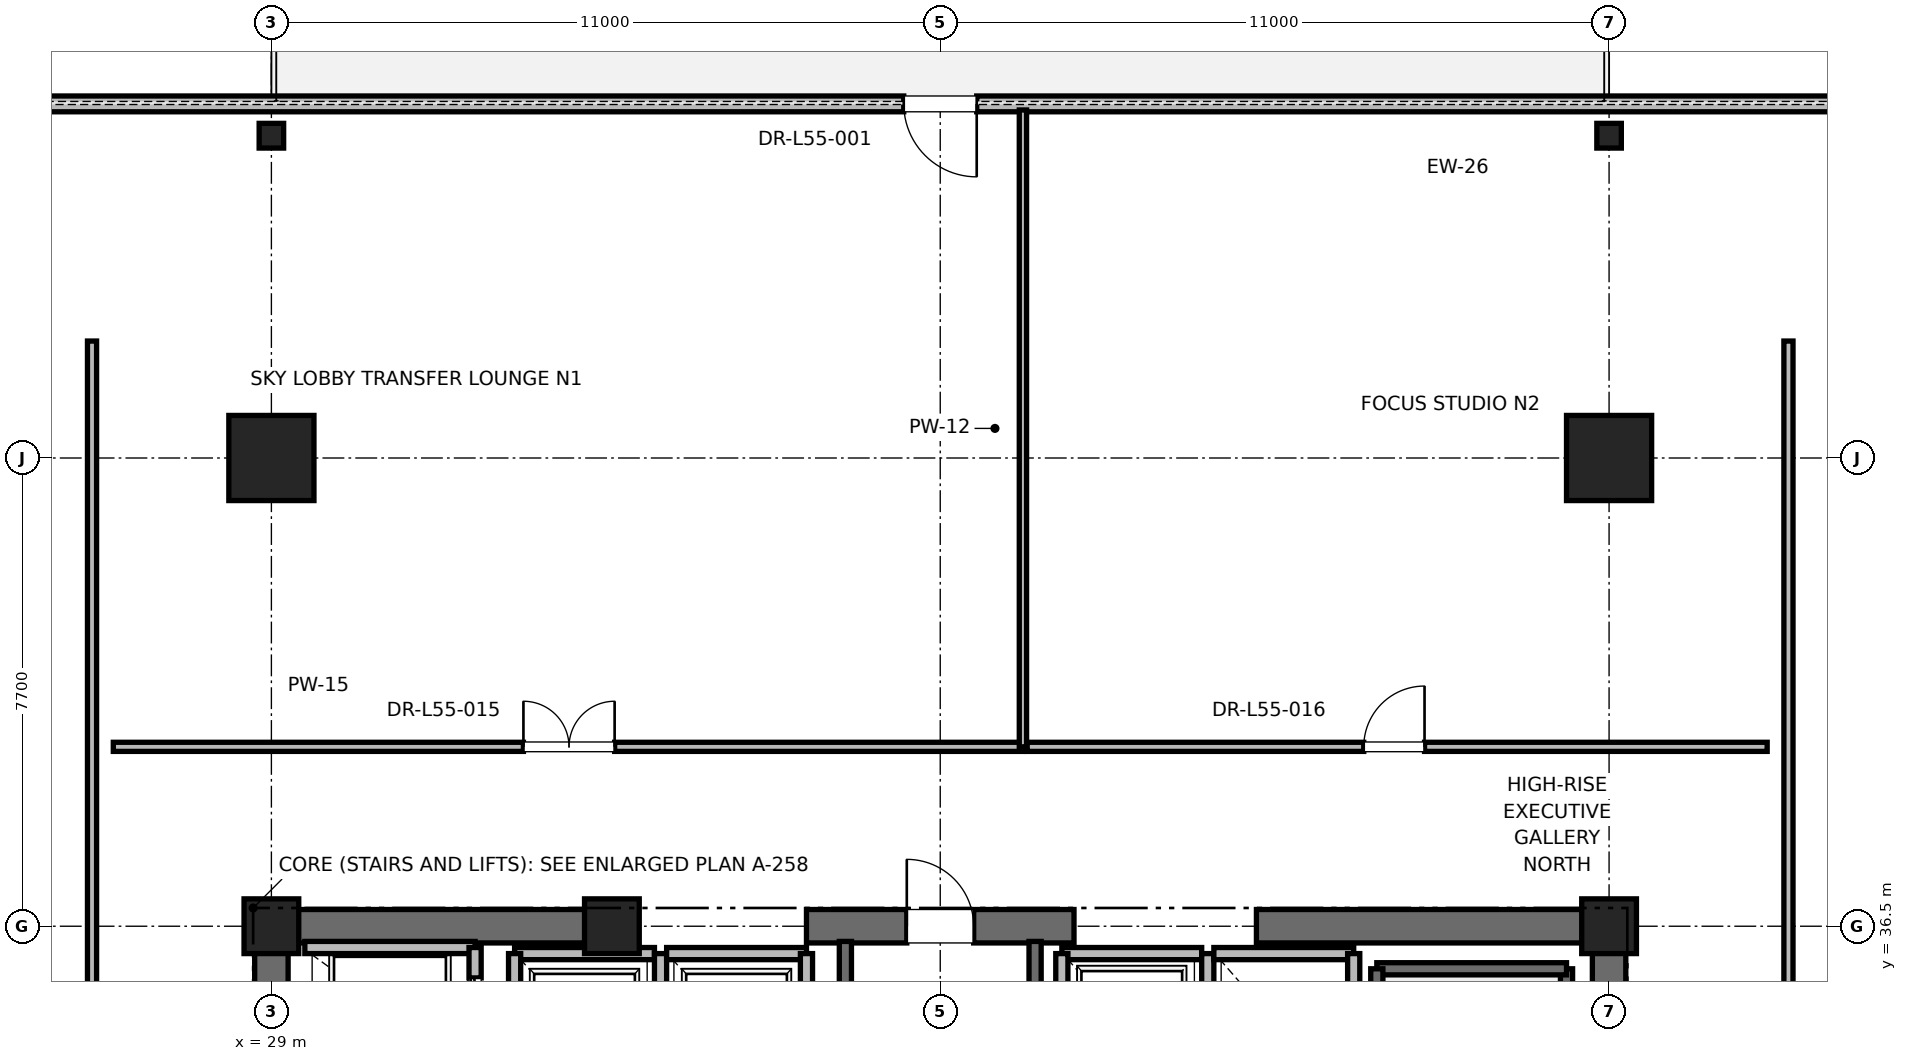
"""IFC4 building model, lengths in metres.
Left out: names, types, materials, properties, quantities, classifications, styles, units other than length and angle.
Written with IfcOpenShell. Run it as: python <this file> out.ifc"""

import sys

from ifc_helpers import new_model, si_unit, direction, frame, frame_2d, origin, origin_2d, place, context, subcontext, project, spatial, rectangle, i_section, extrude, element, fill, save


model = new_model("IFC4")
c1 = context("Model", 3, precision=1e-05, world=origin(), true_north=direction((0.0, 1.0)))
c2 = subcontext(c1, "Body", "Model", "MODEL_VIEW")
j1 = project(units=[si_unit("LENGTHUNIT", "METRE"), si_unit("PLANEANGLEUNIT", "RADIAN")], contexts=[c1])
p1 = place(None, origin())
s1 = spatial("IfcSite", under=j1, at=p1, CompositionType="ELEMENT")
p2 = place(p1, origin())
s2 = spatial("IfcBuilding", under=s1, at=p2, CompositionType="ELEMENT")
p3 = place(p2, frame((0.0, 0.0, 238.2)))
s3 = spatial("IfcBuildingStorey", under=s2, at=p3, CompositionType="ELEMENT", Elevation=238.2)
for number, where, z_axis, x_axis in (
    (1, (29.0, 44.2, 0.0), (0.0, 0.0, 1.0), (1.0, 0.0, 0.0)),
    (2, (51.0, 44.2, 0.0), (0.0, 0.0, 1.0), (1.0, 0.0, 0.0)),
):
    element("IfcColumn", number, at=place(p3, frame(where, z_axis=z_axis, x_axis=x_axis)), inside=s3, PredefinedType="COLUMN", context=c2, shape_type="SweptSolid", body=[
        extrude(rectangle(XDim=1.4, YDim=1.4, at=origin_2d()), origin(), (0.0, 0.0, 1.0), 5.0),
    ])
for number, where, z_axis, x_axis in (
    (3, (29.0, 49.5, 0.0), (0.0, 0.0, 1.0), (1.0, 0.0, 0.0)),
    (4, (51.0, 49.5, 0.0), (0.0, 0.0, 1.0), (1.0, 0.0, 0.0)),
):
    element("IfcColumn", number, at=place(p3, frame(where, z_axis=z_axis, x_axis=x_axis)), inside=s3, PredefinedType="COLUMN", context=c2, shape_type="SweptSolid", body=[
        extrude(i_section(OverallWidth=0.403, OverallDepth=0.406, WebThickness=0.027, FlangeThickness=0.043, FilletRadius=0.015, at=origin_2d()), origin(), (0.0, 0.0, 1.0), 5.0),
    ])
for number, where, z_axis, x_axis in (
    (5, (29.0, 36.5, 0.0), (0.0, 0.0, 1.0), (1.0, 0.0, 0.0)),
    (6, (51.0, 36.5, 0.0), (0.0, 0.0, 1.0), (1.0, 0.0, 0.0)),
    (7, (34.6, 36.5, 0.0), (0.0, 0.0, 1.0), (1.0, 0.0, 0.0)),
):
    element("IfcColumn", number, at=place(p3, frame(where, z_axis=z_axis, x_axis=x_axis)), inside=s3, PredefinedType="PILASTER", context=c2, shape_type="SweptSolid", body=[
        extrude(rectangle(XDim=0.9, YDim=0.9, at=origin_2d()), origin(), (0.0, 0.0, 1.0), 5.0),
    ])
p4 = place(p3, frame((29.0, 36.5, 0.0), z_axis=(0.0, 0.0, 1.0), x_axis=(1.0, 0.0, 0.0)))
e8 = element("IfcWall", 8, at=p4, inside=s3, PredefinedType="SHEAR", context=c2, shape_type="SweptSolid", body=[
    extrude(rectangle(XDim=5.8, YDim=0.55, at=frame_2d((2.9, 0.0))), origin(), (0.0, 0.0, 1.0), 4.785),
])
p5 = place(p3, frame((37.8, 36.5, 0.0), z_axis=(0.0, 0.0, 1.0), x_axis=(1.0, 0.0, 0.0)))
e9 = element("IfcWall", 9, at=p5, inside=s3, PredefinedType="SHEAR", context=c2, shape_type="SweptSolid", body=[
    extrude(rectangle(XDim=4.4, YDim=0.55, at=frame_2d((2.2, 0.0))), origin(), (0.0, 0.0, 1.0), 4.785),
])
p6 = place(p5, frame((1.65, 0.0, 0.0)))
e10 = element("IfcOpeningElement", 10, at=p6, cuts=e9, PredefinedType="OPENING", context=c2, shape_type="SweptSolid", body=[
    extrude(rectangle(XDim=1.1, YDim=2.15, at=frame_2d((0.55, 1.075))), frame((0.0, 0.275, 0.0), z_axis=(0.0, -1.0, 0.0), x_axis=(1.0, 0.0, 0.0)), (0.0, 0.0, 1.0), 0.55),
])
for number, where, z_axis, x_axis in (
    (11, (45.2, 36.5, 0.0), (0.0, 0.0, 1.0), (1.0, 0.0, 0.0)),
    (12, (29.0, 30.7, 0.0), (0.0, 0.0, 1.0), (0.0, 1.0, 0.0)),
):
    element("IfcWall", number, at=place(p3, frame(where, z_axis=z_axis, x_axis=x_axis)), inside=s3, PredefinedType="SHEAR", context=c2, shape_type="SweptSolid", body=[
        extrude(rectangle(XDim=5.8, YDim=0.55, at=frame_2d((2.9, 0.0))), origin(), (0.0, 0.0, 1.0), 4.785),
    ])
p7 = place(p3, frame((51.0, 27.7, 0.0), z_axis=(0.0, 0.0, 1.0), x_axis=(0.0, 1.0, 0.0)))
e13 = element("IfcWall", 13, at=p7, inside=s3, PredefinedType="SHEAR", context=c2, shape_type="SweptSolid", body=[
    extrude(rectangle(XDim=8.8, YDim=0.55, at=frame_2d((4.4, 0.0))), origin(), (0.0, 0.0, 1.0), 4.785),
])
p8 = place(p3, frame((62.221, 50.023, 0.0), z_axis=(0.0, 0.0, 1.0), x_axis=(-1.0, 0.0, 0.0)))
e14 = element("IfcWall", 14, at=p8, inside=s3, PredefinedType="PARAPET", context=c2, shape_type="SweptSolid", body=[
    extrude(rectangle(XDim=44.441, YDim=0.26, at=frame_2d((22.221, 0.0))), origin(), (0.0, 0.0, 1.0), 4.047),
])
p9 = place(p8, frame((4.2, 0.0, 0.85)))
e15 = element("IfcOpeningElement", 15, at=p9, cuts=e14, PredefinedType="OPENING", context=c2, shape_type="SweptSolid", body=[
    extrude(rectangle(XDim=1.6, YDim=2.1, at=frame_2d((0.8, 1.05))), frame((0.0, 0.13, 0.0), z_axis=(0.0, -1.0, 0.0), x_axis=(1.0, 0.0, 0.0)), (0.0, 0.0, 1.0), 0.26),
])
p10 = place(p8, frame((21.621, 0.0, 0.0)))
e16 = element("IfcOpeningElement", 16, at=p10, cuts=e14, PredefinedType="OPENING", context=c2, shape_type="SweptSolid", body=[
    extrude(rectangle(XDim=1.2, YDim=2.2, at=frame_2d((0.6, 1.1))), frame((0.0, 0.13, 0.0), z_axis=(0.0, -1.0, 0.0), x_axis=(1.0, 0.0, 0.0)), (0.0, 0.0, 1.0), 0.26),
])
p11 = place(p8, frame((38.641, 0.0, 0.85)))
e17 = element("IfcOpeningElement", 17, at=p11, cuts=e14, PredefinedType="OPENING", context=c2, shape_type="SweptSolid", body=[
    extrude(rectangle(XDim=1.6, YDim=2.1, at=frame_2d((0.8, 1.05))), frame((0.0, 0.13, 0.0), z_axis=(0.0, -1.0, 0.0), x_axis=(1.0, 0.0, 0.0)), (0.0, 0.0, 1.0), 0.26),
])
p12 = place(p3, frame((50.3, 27.65, 0.0), z_axis=(0.0, 0.0, 1.0), x_axis=(0.0, 1.0, 0.0)))
e18 = element("IfcWall", 18, at=p12, inside=s3, PredefinedType="SOLIDWALL", context=c2, shape_type="SweptSolid", body=[
    extrude(rectangle(XDim=8.15, YDim=0.2, at=frame_2d((4.075, 0.0))), origin(), (0.0, 0.0, 1.0), 4.785),
])
p13 = place(p3, frame((47.18, 35.8, 0.0), z_axis=(0.0, 0.0, 1.0), x_axis=(1.0, 0.0, 0.0)))
e19 = element("IfcWall", 19, at=p13, inside=s3, PredefinedType="SOLIDWALL", context=c2, shape_type="SweptSolid", body=[
    extrude(rectangle(XDim=3.12, YDim=0.2, at=frame_2d((1.56, 0.0))), origin(), (0.0, 0.0, 1.0), 4.785),
])
p14 = place(p3, frame((47.18, 27.62, 0.0), z_axis=(0.0, 0.0, 1.0), x_axis=(0.0, 1.0, 0.0)))
e20 = element("IfcWall", 20, at=p14, inside=s3, PredefinedType="SOLIDWALL", context=c2, shape_type="SweptSolid", body=[
    extrude(rectangle(XDim=8.18, YDim=0.2, at=frame_2d((4.09, 0.0))), origin(), (0.0, 0.0, 1.0), 4.785),
])
p15 = place(p3, frame((38.44, 27.38, 0.0), z_axis=(0.0, 0.0, 1.0), x_axis=(0.0, 1.0, 0.0)))
e21 = element("IfcWall", 21, at=p15, inside=s3, PredefinedType="SOLIDWALL", context=c2, shape_type="SweptSolid", body=[
    extrude(rectangle(XDim=8.87, YDim=0.2, at=frame_2d((4.435, 0.0))), origin(), (0.0, 0.0, 1.0), 4.785),
])
p16 = place(p3, frame((41.56, 27.68, 0.0), z_axis=(0.0, 0.0, 1.0), x_axis=(0.0, 1.0, 0.0)))
e22 = element("IfcWall", 22, at=p16, inside=s3, PredefinedType="SOLIDWALL", context=c2, shape_type="SweptSolid", body=[
    extrude(rectangle(XDim=8.57, YDim=0.2, at=frame_2d((4.285, 0.0))), origin(), (0.0, 0.0, 1.0), 4.785),
])
p17 = place(p3, frame((32.35, 36.15, 0.0), z_axis=(0.0, 0.0, 1.0), x_axis=(-1.0, 0.0, 0.0)))
e23 = element("IfcWall", 23, at=p17, inside=s3, PredefinedType="SOLIDWALL", context=c2, shape_type="SweptSolid", body=[
    extrude(rectangle(XDim=2.8, YDim=0.2, at=frame_2d((1.4, 0.0))), origin(), (0.0, 0.0, 1.0), 4.072),
])
p18 = place(p3, frame((32.35, 34.05, 0.0), z_axis=(0.0, 0.0, 1.0), x_axis=(0.0, 1.0, 0.0)))
e24 = element("IfcWall", 24, at=p18, inside=s3, PredefinedType="SOLIDWALL", context=c2, shape_type="SweptSolid", body=[
    extrude(rectangle(XDim=2.1, YDim=0.2, at=frame_2d((1.05, 0.0))), origin(), (0.0, 0.0, 1.0), 4.785),
])
p19 = place(p18, frame((0.5, 0.0, 0.0)))
e25 = element("IfcOpeningElement", 25, at=p19, cuts=e24, PredefinedType="OPENING", context=c2, shape_type="SweptSolid", body=[
    extrude(rectangle(XDim=1.1, YDim=2.2, at=frame_2d((0.55, 1.1))), frame((0.0, 0.1, 0.0), z_axis=(0.0, -1.0, 0.0), x_axis=(1.0, 0.0, 0.0)), (0.0, 0.0, 1.0), 0.2),
])
p20 = place(p3, frame((35.3, 36.05, 0.0), z_axis=(0.0, 0.0, 1.0), x_axis=(-1.0, 0.0, 0.0)))
e26 = element("IfcWall", 26, at=p20, inside=s3, PredefinedType="SOLIDWALL", context=c2, shape_type="SweptSolid", body=[
    extrude(rectangle(XDim=2.3, YDim=0.2, at=frame_2d((1.15, 0.0))), origin(), (0.0, 0.0, 1.0), 3.765),
])
p21 = place(p3, frame((33.0, 36.05, 0.0), z_axis=(0.0, 0.0, 1.0), x_axis=(0.0, -1.0, 0.0)))
e27 = element("IfcWall", 27, at=p21, inside=s3, PredefinedType="SOLIDWALL", context=c2, shape_type="SweptSolid", body=[
    extrude(rectangle(XDim=2.6, YDim=0.2, at=frame_2d((1.3, 0.0))), origin(), (0.0, 0.0, 1.0), 4.785),
])
p22 = place(p3, frame((35.4, 33.45, 0.0), z_axis=(0.0, 0.0, 1.0), x_axis=(0.0, 1.0, 0.0)))
e28 = element("IfcWall", 28, at=p22, inside=s3, PredefinedType="SOLIDWALL", context=c2, shape_type="SweptSolid", body=[
    extrude(rectangle(XDim=2.6, YDim=0.2, at=frame_2d((1.3, 0.0))), origin(), (0.0, 0.0, 1.0), 3.765),
])
p23 = place(p3, frame((37.8, 36.05, 0.0), z_axis=(0.0, 0.0, 1.0), x_axis=(-1.0, 0.0, 0.0)))
e29 = element("IfcWall", 29, at=p23, inside=s3, PredefinedType="SOLIDWALL", context=c2, shape_type="SweptSolid", body=[
    extrude(rectangle(XDim=2.3, YDim=0.2, at=frame_2d((1.15, 0.0))), origin(), (0.0, 0.0, 1.0), 3.765),
])
p24 = place(p3, frame((37.8, 33.45, 0.0), z_axis=(0.0, 0.0, 1.0), x_axis=(0.0, 1.0, 0.0)))
e30 = element("IfcWall", 30, at=p24, inside=s3, PredefinedType="SOLIDWALL", context=c2, shape_type="SweptSolid", body=[
    extrude(rectangle(XDim=2.6, YDim=0.2, at=frame_2d((1.3, 0.0))), origin(), (0.0, 0.0, 1.0), 3.765),
])
p25 = place(p3, frame((44.3, 36.05, 0.0), z_axis=(0.0, 0.0, 1.0), x_axis=(-1.0, 0.0, 0.0)))
e31 = element("IfcWall", 31, at=p25, inside=s3, PredefinedType="SOLIDWALL", context=c2, shape_type="SweptSolid", body=[
    extrude(rectangle(XDim=2.3, YDim=0.2, at=frame_2d((1.15, 0.0))), origin(), (0.0, 0.0, 1.0), 3.765),
])
for number, where, z_axis, x_axis in (
    (32, (42.0, 36.05, 0.0), (0.0, 0.0, 1.0), (0.0, -1.0, 0.0)),
    (33, (44.4, 33.45, 0.0), (0.0, 0.0, 1.0), (0.0, 1.0, 0.0)),
):
    element("IfcWall", number, at=place(p3, frame(where, z_axis=z_axis, x_axis=x_axis)), inside=s3, PredefinedType="SOLIDWALL", context=c2, shape_type="SweptSolid", body=[
        extrude(rectangle(XDim=2.6, YDim=0.2, at=frame_2d((1.3, 0.0))), origin(), (0.0, 0.0, 1.0), 3.765),
    ])
p26 = place(p3, frame((46.8, 36.05, 0.0), z_axis=(0.0, 0.0, 1.0), x_axis=(-1.0, 0.0, 0.0)))
e34 = element("IfcWall", 34, at=p26, inside=s3, PredefinedType="SOLIDWALL", context=c2, shape_type="SweptSolid", body=[
    extrude(rectangle(XDim=2.3, YDim=0.2, at=frame_2d((1.15, 0.0))), origin(), (0.0, 0.0, 1.0), 3.765),
])
p27 = place(p3, frame((46.8, 33.45, 0.0), z_axis=(0.0, 0.0, 1.0), x_axis=(0.0, 1.0, 0.0)))
e35 = element("IfcWall", 35, at=p27, inside=s3, PredefinedType="SOLIDWALL", context=c2, shape_type="SweptSolid", body=[
    extrude(rectangle(XDim=2.6, YDim=0.2, at=frame_2d((1.3, 0.0))), origin(), (0.0, 0.0, 1.0), 4.785),
])
p28 = place(p3, frame((26.4, 39.45, 0.0), z_axis=(0.0, 0.0, 1.0), x_axis=(1.0, 0.0, 0.0)))
e36 = element("IfcWall", 36, at=p28, inside=s3, PredefinedType="PARTITIONING", context=c2, shape_type="SweptSolid", body=[
    extrude(rectangle(XDim=14.96, YDim=0.15, at=frame_2d((7.48, 0.0))), origin(), (0.0, 0.0, 1.0), 2.85),
])
p29 = place(p28, frame((6.745, 0.0, 0.0)))
e37 = element("IfcOpeningElement", 37, at=p29, cuts=e36, PredefinedType="OPENING", context=c2, shape_type="SweptSolid", body=[
    extrude(rectangle(XDim=1.5, YDim=2.25, at=frame_2d((0.75, 1.125))), frame((0.0, 0.075, 0.0), z_axis=(0.0, -1.0, 0.0), x_axis=(1.0, 0.0, 0.0)), (0.0, 0.0, 1.0), 0.15),
])
p30 = place(p3, frame((41.36, 39.45, 0.0), z_axis=(0.0, 0.0, 1.0), x_axis=(0.0, 1.0, 0.0)))
e38 = element("IfcWall", 38, at=p30, inside=s3, PredefinedType="PARTITIONING", context=c2, shape_type="SweptSolid", body=[
    extrude(rectangle(XDim=10.473, YDim=0.12, at=frame_2d((5.237, 0.0))), origin(), (0.0, 0.0, 1.0), 2.85),
])
p31 = place(p3, frame((41.43, 39.45, 0.0), z_axis=(0.0, 0.0, 1.0), x_axis=(1.0, 0.0, 0.0)))
e39 = element("IfcWall", 39, at=p31, inside=s3, PredefinedType="PARTITIONING", context=c2, shape_type="SweptSolid", body=[
    extrude(rectangle(XDim=12.17, YDim=0.15, at=frame_2d((6.085, 0.0))), origin(), (0.0, 0.0, 1.0), 2.85),
])
p32 = place(p31, frame((5.535, 0.0, 0.0)))
e40 = element("IfcOpeningElement", 40, at=p32, cuts=e39, PredefinedType="OPENING", context=c2, shape_type="SweptSolid", body=[
    extrude(rectangle(XDim=1.0, YDim=2.15, at=frame_2d((0.5, 1.075))), frame((0.0, 0.075, 0.0), z_axis=(0.0, -1.0, 0.0), x_axis=(1.0, 0.0, 0.0)), (0.0, 0.0, 1.0), 0.15),
])
p33 = place(p3, frame((26.05, 24.59, 0.0), z_axis=(0.0, 0.0, 1.0), x_axis=(0.0, 1.0, 0.0)))
e41 = element("IfcWall", 41, at=p33, inside=s3, PredefinedType="PARTITIONING", context=c2, shape_type="SweptSolid", body=[
    extrude(rectangle(XDim=21.533, YDim=0.15, at=frame_2d((10.767, 0.0))), origin(), (0.0, 0.0, 1.0), 2.85),
])
p34 = place(p33, frame((5.405, 0.0, 0.0)))
e42 = element("IfcOpeningElement", 42, at=p34, cuts=e41, PredefinedType="OPENING", context=c2, shape_type="SweptSolid", body=[
    extrude(rectangle(XDim=1.0, YDim=2.15, at=frame_2d((0.5, 1.075))), frame((0.0, 0.075, 0.0), z_axis=(0.0, -1.0, 0.0), x_axis=(1.0, 0.0, 0.0)), (0.0, 0.0, 1.0), 0.15),
])
p35 = place(p3, frame((53.95, 30.55, 0.0), z_axis=(0.0, 0.0, 1.0), x_axis=(0.0, 1.0, 0.0)))
e43 = element("IfcWall", 43, at=p35, inside=s3, PredefinedType="PARTITIONING", context=c2, shape_type="SweptSolid", body=[
    extrude(rectangle(XDim=15.573, YDim=0.15, at=frame_2d((7.787, 0.0))), origin(), (0.0, 0.0, 1.0), 2.85),
])
p36 = place(p35, frame((2.4, 0.0, 0.0)))
e44 = element("IfcOpeningElement", 44, at=p36, cuts=e43, PredefinedType="OPENING", context=c2, shape_type="SweptSolid", body=[
    extrude(rectangle(XDim=1.05, YDim=2.2, at=frame_2d((0.525, 1.1))), frame((0.0, 0.075, 0.0), z_axis=(0.0, -1.0, 0.0), x_axis=(1.0, 0.0, 0.0)), (0.0, 0.0, 1.0), 0.15),
])
p37 = place(p10, origin())
e45 = element("IfcDoor", 45, at=p37, inside=s3, OperationType="SINGLE_SWING_LEFT", PredefinedType="DOOR", context=c2, shape_type="SweptSolid", body=[
    extrude(rectangle(XDim=1.2, YDim=2.2, at=frame_2d((0.6, 1.1))), frame((0.0, 0.025, 0.0), z_axis=(0.0, -1.0, 0.0), x_axis=(1.0, 0.0, 0.0)), (0.0, 0.0, 1.0), 0.05),
])
fill(e16, e45)
p38 = place(p6, origin())
e46 = element("IfcDoor", 46, at=p38, inside=s3, OperationType="SINGLE_SWING_LEFT", PredefinedType="DOOR", context=c2, shape_type="SweptSolid", body=[
    extrude(rectangle(XDim=1.1, YDim=2.15, at=frame_2d((0.55, 1.075))), frame((0.0, 0.025, 0.0), z_axis=(0.0, -1.0, 0.0), x_axis=(1.0, 0.0, 0.0)), (0.0, 0.0, 1.0), 0.05),
])
fill(e10, e46)
p39 = place(p19, origin())
e47 = element("IfcDoor", 47, at=p39, inside=s3, OperationType="SLIDING_TO_RIGHT", PredefinedType="DOOR", context=c2, shape_type="SweptSolid", body=[
    extrude(rectangle(XDim=1.1, YDim=2.2, at=frame_2d((0.55, 1.1))), frame((0.0, 0.025, 0.0), z_axis=(0.0, -1.0, 0.0), x_axis=(1.0, 0.0, 0.0)), (0.0, 0.0, 1.0), 0.05),
])
fill(e25, e47)
p40 = place(p29, origin())
e48 = element("IfcDoor", 48, at=p40, inside=s3, OperationType="DOUBLE_DOOR_SINGLE_SWING", PredefinedType="DOOR", context=c2, shape_type="SweptSolid", body=[
    extrude(rectangle(XDim=1.5, YDim=2.25, at=frame_2d((0.75, 1.125))), frame((0.0, 0.025, 0.0), z_axis=(0.0, -1.0, 0.0), x_axis=(1.0, 0.0, 0.0)), (0.0, 0.0, 1.0), 0.05),
])
fill(e37, e48)
p41 = place(p32, origin())
e49 = element("IfcDoor", 49, at=p41, inside=s3, OperationType="SINGLE_SWING_RIGHT", PredefinedType="DOOR", context=c2, shape_type="SweptSolid", body=[
    extrude(rectangle(XDim=1.0, YDim=2.15, at=frame_2d((0.5, 1.075))), frame((0.0, 0.025, 0.0), z_axis=(0.0, -1.0, 0.0), x_axis=(1.0, 0.0, 0.0)), (0.0, 0.0, 1.0), 0.05),
])
fill(e40, e49)
save(model, sys.argv[1])
